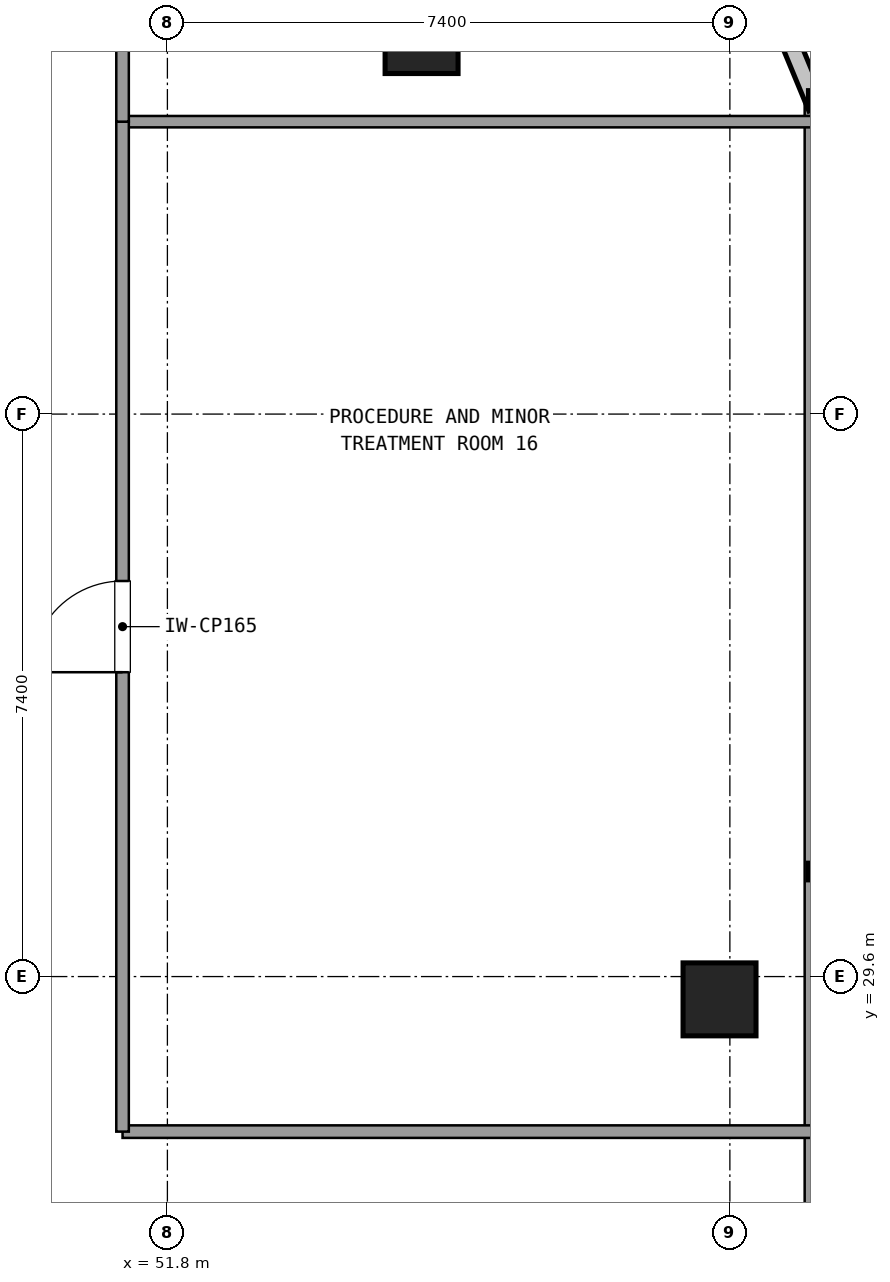
"""IFC4 building model, lengths in metres.
Left out: names, types, materials, properties, quantities, classifications, styles, units other than length and angle.
Written with IfcOpenShell. Run it as: python <this file> out.ifc"""

import sys

from ifc_helpers import new_model, si_unit, direction, frame, frame_2d, origin, origin_2d, place, context, subcontext, project, spatial, rectangle, extrude, element, fill, save


model = new_model("IFC4")
c1 = context("Model", 3, precision=1e-05, world=origin(), true_north=direction((0.0, 1.0)))
c2 = subcontext(c1, "Body", "Model", "MODEL_VIEW")
j1 = project(units=[si_unit("LENGTHUNIT", "METRE"), si_unit("PLANEANGLEUNIT", "RADIAN")], contexts=[c1])
p1 = place(None, origin())
s1 = spatial("IfcSite", under=j1, at=p1, CompositionType="ELEMENT")
p2 = place(p1, origin())
s2 = spatial("IfcBuilding", under=s1, at=p2, CompositionType="ELEMENT")
p3 = place(p2, frame((0.0, 0.0, 134.82)))
s3 = spatial("IfcBuildingStorey", under=s2, at=p3, CompositionType="ELEMENT", Elevation=134.82)
for number, where, z_axis, x_axis in (
    (1, (59.064, 29.3, 0.0), (0.0, 0.0, 1.0), (1.0, 0.0, 0.0)),
    (2, (55.144, 41.96, 0.0), (0.0, 0.0, 1.0), (1.0, 0.0, 0.0)),
):
    element("IfcColumn", number, at=place(p3, frame(where, z_axis=z_axis, x_axis=x_axis)), inside=s3, PredefinedType="COLUMN", context=c2, shape_type="SweptSolid", body=[
        extrude(rectangle(XDim=0.96, YDim=0.96, at=origin_2d()), origin(), (0.0, 0.0, 1.0), 3.6),
    ])
p4 = place(p3, frame((60.304, 10.655, 0.0), z_axis=(0.0, 0.0, 1.0), x_axis=(0.0, 1.0, 0.0)))
e3 = element("IfcWall", 3, at=p4, inside=s3, PredefinedType="SOLIDWALL", context=c2, shape_type="SweptSolid", body=[
    extrude(rectangle(XDim=30.49, YDim=0.24, at=frame_2d((15.245, 0.0))), origin(), (0.0, 0.0, 1.0), 0.85),
])
p5 = place(p3, frame((51.21, 27.56, 0.0), z_axis=(0.0, 0.0, 1.0), x_axis=(1.0, 0.0, 0.0)))
e4 = element("IfcWall", 4, at=p5, inside=s3, PredefinedType="PARTITIONING", context=c2, shape_type="SweptSolid", body=[
    extrude(rectangle(XDim=9.074, YDim=0.165, at=frame_2d((4.537, 0.0))), origin(), (0.0, 0.0, 1.0), 2.61),
])
p6 = place(p3, frame((51.21, 40.847, 0.0), z_axis=(0.0, 0.0, 1.0), x_axis=(1.0, 0.0, 0.0)))
e5 = element("IfcWall", 5, at=p6, inside=s3, PredefinedType="PARTITIONING", context=c2, shape_type="SweptSolid", body=[
    extrude(rectangle(XDim=9.074, YDim=0.15, at=frame_2d((4.537, 0.0))), origin(), (0.0, 0.0, 1.0), 2.61),
])
p7 = place(p3, frame((51.21, 27.56, 0.0), z_axis=(0.0, 0.0, 1.0), x_axis=(0.0, 1.0, 0.0)))
e6 = element("IfcWall", 6, at=p7, inside=s3, PredefinedType="PARTITIONING", context=c2, shape_type="SweptSolid", body=[
    extrude(rectangle(XDim=13.287, YDim=0.165, at=frame_2d((6.644, 0.0))), origin(), (0.0, 0.0, 1.0), 2.61),
])
p8 = place(p7, frame((6.044, 0.0, 0.0)))
e7 = element("IfcOpeningElement", 7, at=p8, cuts=e6, PredefinedType="OPENING", context=c2, shape_type="SweptSolid", body=[
    extrude(rectangle(XDim=1.2, YDim=2.15, at=frame_2d((0.6, 1.075))), frame((0.0, 0.093, 0.0), z_axis=(0.0, -1.0, 0.0), x_axis=(1.0, 0.0, 0.0)), (0.0, 0.0, 1.0), 0.185),
])
p9 = place(p3, frame((51.21, 40.847, 0.0), z_axis=(0.0, 0.0, 1.0), x_axis=(0.0, 1.0, 0.0)))
e8 = element("IfcWall", 8, at=p9, inside=s3, PredefinedType="PARTITIONING", context=c2, shape_type="SweptSolid", body=[
    extrude(rectangle(XDim=6.253, YDim=0.165, at=frame_2d((3.126, 0.0))), origin(), (0.0, 0.0, 1.0), 2.61),
])
p10 = place(p9, frame((2.526, 0.0, 0.0)))
e9 = element("IfcOpeningElement", 9, at=p10, cuts=e8, PredefinedType="OPENING", context=c2, shape_type="SweptSolid", body=[
    extrude(rectangle(XDim=1.2, YDim=2.15, at=frame_2d((0.6, 1.075))), frame((0.0, 0.093, 0.0), z_axis=(0.0, -1.0, 0.0), x_axis=(1.0, 0.0, 0.0)), (0.0, 0.0, 1.0), 0.185),
])
p11 = place(p8, origin())
e10 = element("IfcDoor", 10, at=p11, inside=s3, OperationType="SINGLE_SWING_LEFT", PredefinedType="DOOR", context=c2, shape_type="SweptSolid", body=[
    extrude(rectangle(XDim=1.2, YDim=2.15, at=frame_2d((0.6, 1.075))), frame((0.0, 0.025, 0.0), z_axis=(0.0, -1.0, 0.0), x_axis=(1.0, 0.0, 0.0)), (0.0, 0.0, 1.0), 0.05),
])
fill(e7, e10)
save(model, sys.argv[1])
